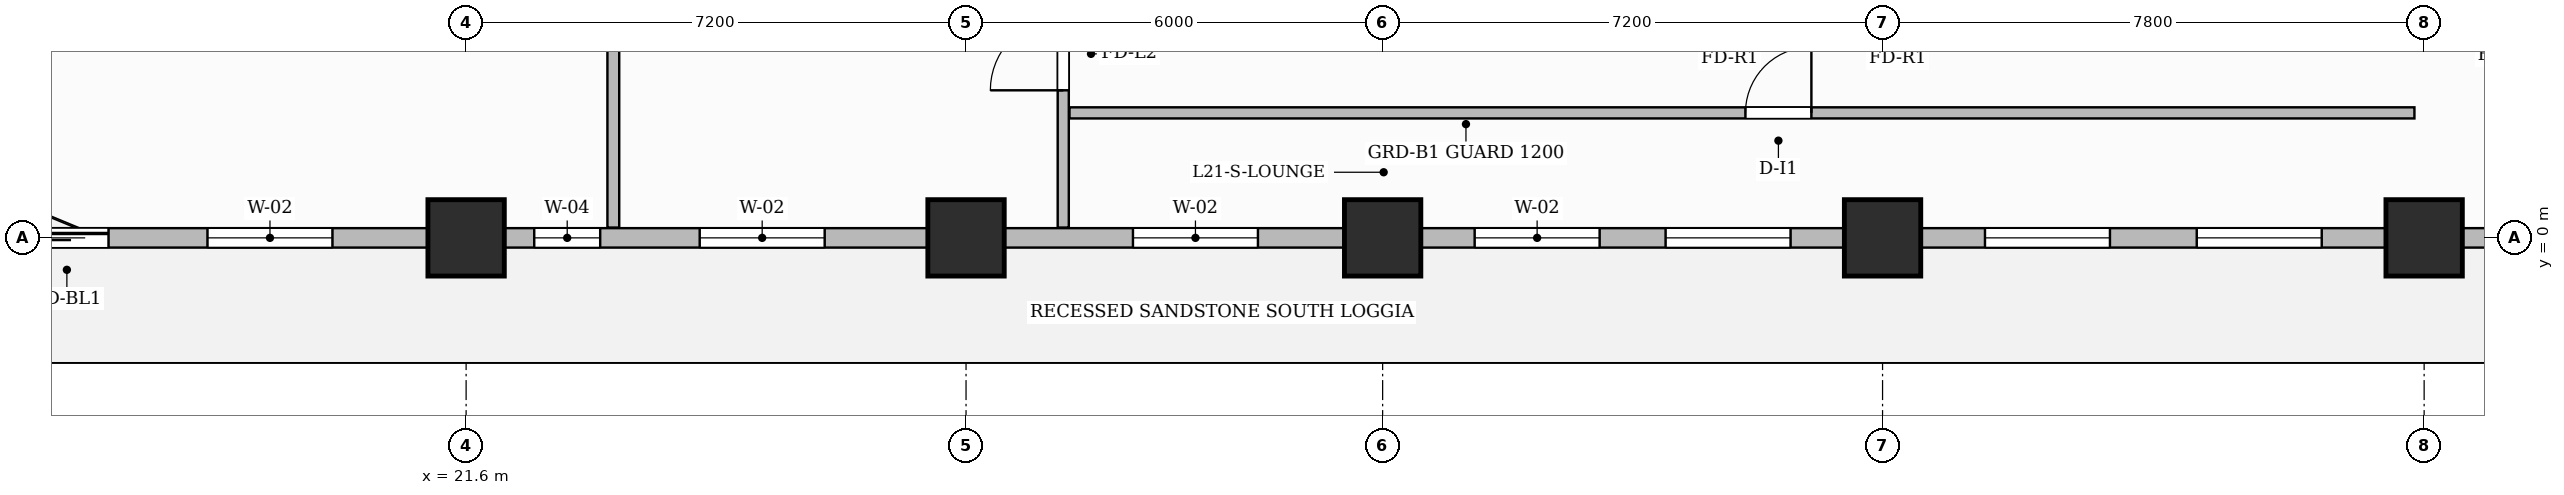
"""IFC4 building model, lengths in metres.
Left out: names, types, materials, properties, quantities, classifications, styles, units other than length and angle.
Written with IfcOpenShell. Run it as: python <this file> out.ifc"""

import sys

from ifc_helpers import new_model, si_unit, direction, frame, frame_2d, origin, origin_2d, place, context, subcontext, project, spatial, rectangle, extrude, source, transform, mapped, element, fill, save


model = new_model("IFC4")
c1 = context("Model", 3, precision=1e-05, world=origin(), true_north=direction((0.0, 1.0)))
c2 = subcontext(c1, "Body", "Model", "MODEL_VIEW")
j1 = project(units=[si_unit("LENGTHUNIT", "METRE"), si_unit("PLANEANGLEUNIT", "RADIAN")], contexts=[c1])
p1 = place(None, origin())
s1 = spatial("IfcSite", under=j1, at=p1, CompositionType="ELEMENT")
p2 = place(p1, origin())
s2 = spatial("IfcBuilding", under=s1, at=p2, CompositionType="ELEMENT")
p3 = place(p2, frame((0.0, 0.0, 87.9)))
s3 = spatial("IfcBuildingStorey", under=s2, at=p3, CompositionType="ELEMENT", Elevation=87.9)
m1 = source(origin(), c2, "Body", "SweptSolid", [
    extrude(rectangle(XDim=1.1, YDim=1.1, at=origin_2d()), origin(), (0.0, 0.0, 1.0), 3.7),
])
for number, where, z_axis, x_axis in (
    (1, (21.6, 0.0, 0.0), (0.0, 0.0, 1.0), (1.0, 0.0, 0.0)),
    (2, (28.8, 0.0, 0.0), (0.0, 0.0, 1.0), (1.0, 0.0, 0.0)),
    (3, (34.8, 0.0, 0.0), (0.0, 0.0, 1.0), (1.0, 0.0, 0.0)),
    (4, (42.0, 0.0, 0.0), (0.0, 0.0, 1.0), (1.0, 0.0, 0.0)),
    (5, (49.8, 0.0, 0.0), (0.0, 0.0, 1.0), (1.0, 0.0, 0.0)),
):
    element("IfcColumn", number, at=place(p3, frame(where, z_axis=z_axis, x_axis=x_axis)), inside=s3, PredefinedType="COLUMN", context=c2, shape_type="MappedRepresentation", body=[
        mapped(m1, transform((0.0, 0.0, 0.0), scale=1.0)),
    ])
p4 = place(p3, frame((30.2, 0.148, 0.0), z_axis=(0.0, 0.0, 1.0), x_axis=(0.0, 1.0, 0.0)))
e6 = element("IfcWall", 6, at=p4, inside=s3, PredefinedType="PARTITIONING", context=c2, shape_type="SweptSolid", body=[
    extrude(rectangle(XDim=9.712, YDim=0.16, at=frame_2d((4.856, 0.0))), origin(), (0.0, 0.0, 1.0), 3.45),
])
p5 = place(p4, frame((1.977, 0.0, 0.0)))
e7 = element("IfcOpeningElement", 7, at=p5, cuts=e6, PredefinedType="OPENING", context=c2, shape_type="SweptSolid", body=[
    extrude(rectangle(XDim=1.05, YDim=2.15, at=frame_2d((0.525, 1.075))), frame((0.0, 0.09, 0.0), z_axis=(0.0, -1.0, 0.0), x_axis=(1.0, 0.0, 0.0)), (0.0, 0.0, 1.0), 0.18),
])
p6 = place(p3, frame((30.29, 1.8, 0.0), z_axis=(0.0, 0.0, 1.0), x_axis=(1.0, 0.0, 0.0)))
e8 = element("IfcWall", 8, at=p6, inside=s3, PredefinedType="PARTITIONING", context=c2, shape_type="SweptSolid", body=[
    extrude(rectangle(XDim=19.37, YDim=0.16, at=frame_2d((9.685, 0.0))), origin(), (0.0, 0.0, 1.0), 3.45),
])
p7 = place(p6, frame((9.735, 0.0, 0.0)))
e9 = element("IfcOpeningElement", 9, at=p7, cuts=e8, PredefinedType="OPENING", context=c2, shape_type="SweptSolid", body=[
    extrude(rectangle(XDim=0.95, YDim=2.15, at=frame_2d((0.475, 1.075))), frame((0.0, 0.09, 0.0), z_axis=(0.0, -1.0, 0.0), x_axis=(1.0, 0.0, 0.0)), (0.0, 0.0, 1.0), 0.18),
])
p8 = place(p3, frame((23.72, 0.148, 0.0), z_axis=(0.0, 0.0, 1.0), x_axis=(0.0, 1.0, 0.0)))
e10 = element("IfcWall", 10, at=p8, inside=s3, PredefinedType="PARTITIONING", context=c2, shape_type="SweptSolid", body=[
    extrude(rectangle(XDim=9.712, YDim=0.17, at=frame_2d((4.856, 0.0))), origin(), (0.0, 0.0, 1.0), 3.45),
])
p9 = place(p3, frame((14.4, 0.0, 0.0), z_axis=(0.0, 0.0, 1.0), x_axis=(1.0, 0.0, 0.0)))
e11 = element("IfcWall", 11, at=p9, inside=s3, PredefinedType="SOLIDWALL", context=c2, shape_type="SweptSolid", body=[
    extrude(rectangle(XDim=43.2, YDim=0.28, at=frame_2d((21.6, 0.0))), origin(), (0.0, 0.0, 1.0), 2.885),
])
p10 = place(p9, frame((0.85, 0.0, 0.0)))
e12 = element("IfcOpeningElement", 12, at=p10, cuts=e11, PredefinedType="OPENING", context=c2, shape_type="SweptSolid", body=[
    extrude(rectangle(XDim=1.2, YDim=2.2, at=frame_2d((0.6, 1.1))), frame((0.0, 0.15, 0.0), z_axis=(0.0, -1.0, 0.0), x_axis=(1.0, 0.0, 0.0)), (0.0, 0.0, 1.0), 0.3),
])
p11 = place(p9, frame((3.475, 0.0, 0.8)))
e13 = element("IfcOpeningElement", 13, at=p11, cuts=e11, PredefinedType="OPENING", context=c2, shape_type="SweptSolid", body=[
    extrude(rectangle(XDim=1.8, YDim=1.85, at=frame_2d((0.9, 0.925))), frame((0.0, 0.15, 0.0), z_axis=(0.0, -1.0, 0.0), x_axis=(1.0, 0.0, 0.0)), (0.0, 0.0, 1.0), 0.3),
])
p12 = place(p9, frame((8.181, 0.0, 0.8)))
e14 = element("IfcOpeningElement", 14, at=p12, cuts=e11, PredefinedType="OPENING", context=c2, shape_type="SweptSolid", body=[
    extrude(rectangle(XDim=0.95, YDim=1.75, at=frame_2d((0.475, 0.875))), frame((0.0, 0.15, 0.0), z_axis=(0.0, -1.0, 0.0), x_axis=(1.0, 0.0, 0.0)), (0.0, 0.0, 1.0), 0.3),
])
p13 = place(p9, frame((10.564, 0.0, 0.8)))
e15 = element("IfcOpeningElement", 15, at=p13, cuts=e11, PredefinedType="OPENING", context=c2, shape_type="SweptSolid", body=[
    extrude(rectangle(XDim=1.8, YDim=1.85, at=frame_2d((0.9, 0.925))), frame((0.0, 0.15, 0.0), z_axis=(0.0, -1.0, 0.0), x_axis=(1.0, 0.0, 0.0)), (0.0, 0.0, 1.0), 0.3),
])
p14 = place(p9, frame((16.804, 0.0, 0.8)))
e16 = element("IfcOpeningElement", 16, at=p14, cuts=e11, PredefinedType="OPENING", context=c2, shape_type="SweptSolid", body=[
    extrude(rectangle(XDim=1.8, YDim=1.85, at=frame_2d((0.9, 0.925))), frame((0.0, 0.15, 0.0), z_axis=(0.0, -1.0, 0.0), x_axis=(1.0, 0.0, 0.0)), (0.0, 0.0, 1.0), 0.3),
])
p15 = place(p9, frame((21.725, 0.0, 0.8)))
e17 = element("IfcOpeningElement", 17, at=p15, cuts=e11, PredefinedType="OPENING", context=c2, shape_type="SweptSolid", body=[
    extrude(rectangle(XDim=1.8, YDim=1.85, at=frame_2d((0.9, 0.925))), frame((0.0, 0.15, 0.0), z_axis=(0.0, -1.0, 0.0), x_axis=(1.0, 0.0, 0.0)), (0.0, 0.0, 1.0), 0.3),
])
p16 = place(p9, frame((24.475, 0.0, 0.8)))
e18 = element("IfcOpeningElement", 18, at=p16, cuts=e11, PredefinedType="OPENING", context=c2, shape_type="SweptSolid", body=[
    extrude(rectangle(XDim=1.8, YDim=1.85, at=frame_2d((0.9, 0.925))), frame((0.0, 0.15, 0.0), z_axis=(0.0, -1.0, 0.0), x_axis=(1.0, 0.0, 0.0)), (0.0, 0.0, 1.0), 0.3),
])
p17 = place(p9, frame((29.075, 0.0, 0.8)))
e19 = element("IfcOpeningElement", 19, at=p17, cuts=e11, PredefinedType="OPENING", context=c2, shape_type="SweptSolid", body=[
    extrude(rectangle(XDim=1.8, YDim=1.85, at=frame_2d((0.9, 0.925))), frame((0.0, 0.15, 0.0), z_axis=(0.0, -1.0, 0.0), x_axis=(1.0, 0.0, 0.0)), (0.0, 0.0, 1.0), 0.3),
])
p18 = place(p9, frame((32.125, 0.0, 0.8)))
e20 = element("IfcOpeningElement", 20, at=p18, cuts=e11, PredefinedType="OPENING", context=c2, shape_type="SweptSolid", body=[
    extrude(rectangle(XDim=1.8, YDim=1.85, at=frame_2d((0.9, 0.925))), frame((0.0, 0.15, 0.0), z_axis=(0.0, -1.0, 0.0), x_axis=(1.0, 0.0, 0.0)), (0.0, 0.0, 1.0), 0.3),
])
p19 = place(p9, frame((36.875, 0.0, 0.8)))
e21 = element("IfcOpeningElement", 21, at=p19, cuts=e11, PredefinedType="OPENING", context=c2, shape_type="SweptSolid", body=[
    extrude(rectangle(XDim=1.8, YDim=1.85, at=frame_2d((0.9, 0.925))), frame((0.0, 0.15, 0.0), z_axis=(0.0, -1.0, 0.0), x_axis=(1.0, 0.0, 0.0)), (0.0, 0.0, 1.0), 0.3),
])
p20 = place(p9, frame((39.925, 0.0, 0.8)))
e22 = element("IfcOpeningElement", 22, at=p20, cuts=e11, PredefinedType="OPENING", context=c2, shape_type="SweptSolid", body=[
    extrude(rectangle(XDim=1.8, YDim=1.85, at=frame_2d((0.9, 0.925))), frame((0.0, 0.15, 0.0), z_axis=(0.0, -1.0, 0.0), x_axis=(1.0, 0.0, 0.0)), (0.0, 0.0, 1.0), 0.3),
])
m2 = source(origin(), c2, "Body", "SweptSolid", [
    extrude(rectangle(XDim=1.05, YDim=2.15, at=frame_2d((0.525, 1.075))), frame((0.0, 0.025, 0.0), z_axis=(0.0, -1.0, 0.0), x_axis=(1.0, 0.0, 0.0)), (0.0, 0.0, 1.0), 0.05),
])
p21 = place(p5, origin())
e23 = element("IfcDoor", 23, at=p21, inside=s3, OperationType="SINGLE_SWING_LEFT", PredefinedType="DOOR", context=c2, shape_type="MappedRepresentation", body=[
    mapped(m2, transform((0.0, 0.0, 0.0), scale=1.0)),
])
fill(e7, e23)
m3 = source(origin(), c2, "Body", "SweptSolid", [
    extrude(rectangle(XDim=0.95, YDim=2.15, at=frame_2d((0.475, 1.075))), frame((0.0, 0.025, 0.0), z_axis=(0.0, -1.0, 0.0), x_axis=(1.0, 0.0, 0.0)), (0.0, 0.0, 1.0), 0.05),
])
p22 = place(p7, origin())
e24 = element("IfcDoor", 24, at=p22, inside=s3, OperationType="SINGLE_SWING_RIGHT", PredefinedType="DOOR", context=c2, shape_type="MappedRepresentation", body=[
    mapped(m3, transform((0.0, 0.0, 0.0), scale=1.0)),
])
fill(e9, e24)
m4 = source(origin(), c2, "Body", "SweptSolid", [
    extrude(rectangle(XDim=1.2, YDim=2.2, at=frame_2d((0.6, 1.1))), frame((0.0, 0.025, 0.0), z_axis=(0.0, -1.0, 0.0), x_axis=(1.0, 0.0, 0.0)), (0.0, 0.0, 1.0), 0.05),
])
p23 = place(p10, origin())
e25 = element("IfcDoor", 25, at=p23, inside=s3, OperationType="SLIDING_TO_LEFT", PredefinedType="DOOR", context=c2, shape_type="MappedRepresentation", body=[
    mapped(m4, transform((0.0, 0.0, 0.0), scale=1.0)),
])
fill(e12, e25)
m5 = source(origin(), c2, "Body", "SweptSolid", [
    extrude(rectangle(XDim=1.8, YDim=1.85, at=frame_2d((0.9, 0.925))), frame((0.0, 0.03, 0.0), z_axis=(0.0, -1.0, 0.0), x_axis=(1.0, 0.0, 0.0)), (0.0, 0.0, 1.0), 0.06),
])
p24 = place(p11, origin())
e26 = element("IfcWindow", 26, at=p24, inside=s3, PartitioningType="DOUBLE_PANEL_VERTICAL", PredefinedType="WINDOW", context=c2, shape_type="MappedRepresentation", body=[
    mapped(m5, transform((0.0, 0.0, 0.0), scale=1.0)),
])
fill(e13, e26)
m6 = source(origin(), c2, "Body", "SweptSolid", [
    extrude(rectangle(XDim=0.95, YDim=1.75, at=frame_2d((0.475, 0.875))), frame((0.0, 0.03, 0.0), z_axis=(0.0, -1.0, 0.0), x_axis=(1.0, 0.0, 0.0)), (0.0, 0.0, 1.0), 0.06),
])
p25 = place(p12, origin())
e27 = element("IfcWindow", 27, at=p25, inside=s3, PartitioningType="SINGLE_PANEL", PredefinedType="WINDOW", context=c2, shape_type="MappedRepresentation", body=[
    mapped(m6, transform((0.0, 0.0, 0.0), scale=1.0)),
])
fill(e14, e27)
p26 = place(p13, origin())
e28 = element("IfcWindow", 28, at=p26, inside=s3, PartitioningType="DOUBLE_PANEL_VERTICAL", PredefinedType="WINDOW", context=c2, shape_type="MappedRepresentation", body=[
    mapped(m5, transform((0.0, 0.0, 0.0), scale=1.0)),
])
fill(e15, e28)
p27 = place(p14, origin())
e29 = element("IfcWindow", 29, at=p27, inside=s3, PartitioningType="DOUBLE_PANEL_VERTICAL", PredefinedType="WINDOW", context=c2, shape_type="MappedRepresentation", body=[
    mapped(m5, transform((0.0, 0.0, 0.0), scale=1.0)),
])
fill(e16, e29)
p28 = place(p15, origin())
e30 = element("IfcWindow", 30, at=p28, inside=s3, PartitioningType="DOUBLE_PANEL_VERTICAL", PredefinedType="WINDOW", context=c2, shape_type="MappedRepresentation", body=[
    mapped(m5, transform((0.0, 0.0, 0.0), scale=1.0)),
])
fill(e17, e30)
p29 = place(p16, origin())
e31 = element("IfcWindow", 31, at=p29, inside=s3, PartitioningType="DOUBLE_PANEL_VERTICAL", PredefinedType="WINDOW", context=c2, shape_type="MappedRepresentation", body=[
    mapped(m5, transform((0.0, 0.0, 0.0), scale=1.0)),
])
fill(e18, e31)
p30 = place(p17, origin())
e32 = element("IfcWindow", 32, at=p30, inside=s3, PartitioningType="DOUBLE_PANEL_VERTICAL", PredefinedType="WINDOW", context=c2, shape_type="MappedRepresentation", body=[
    mapped(m5, transform((0.0, 0.0, 0.0), scale=1.0)),
])
fill(e19, e32)
p31 = place(p18, origin())
e33 = element("IfcWindow", 33, at=p31, inside=s3, PartitioningType="DOUBLE_PANEL_VERTICAL", PredefinedType="WINDOW", context=c2, shape_type="MappedRepresentation", body=[
    mapped(m5, transform((0.0, 0.0, 0.0), scale=1.0)),
])
fill(e20, e33)
save(model, sys.argv[1])
